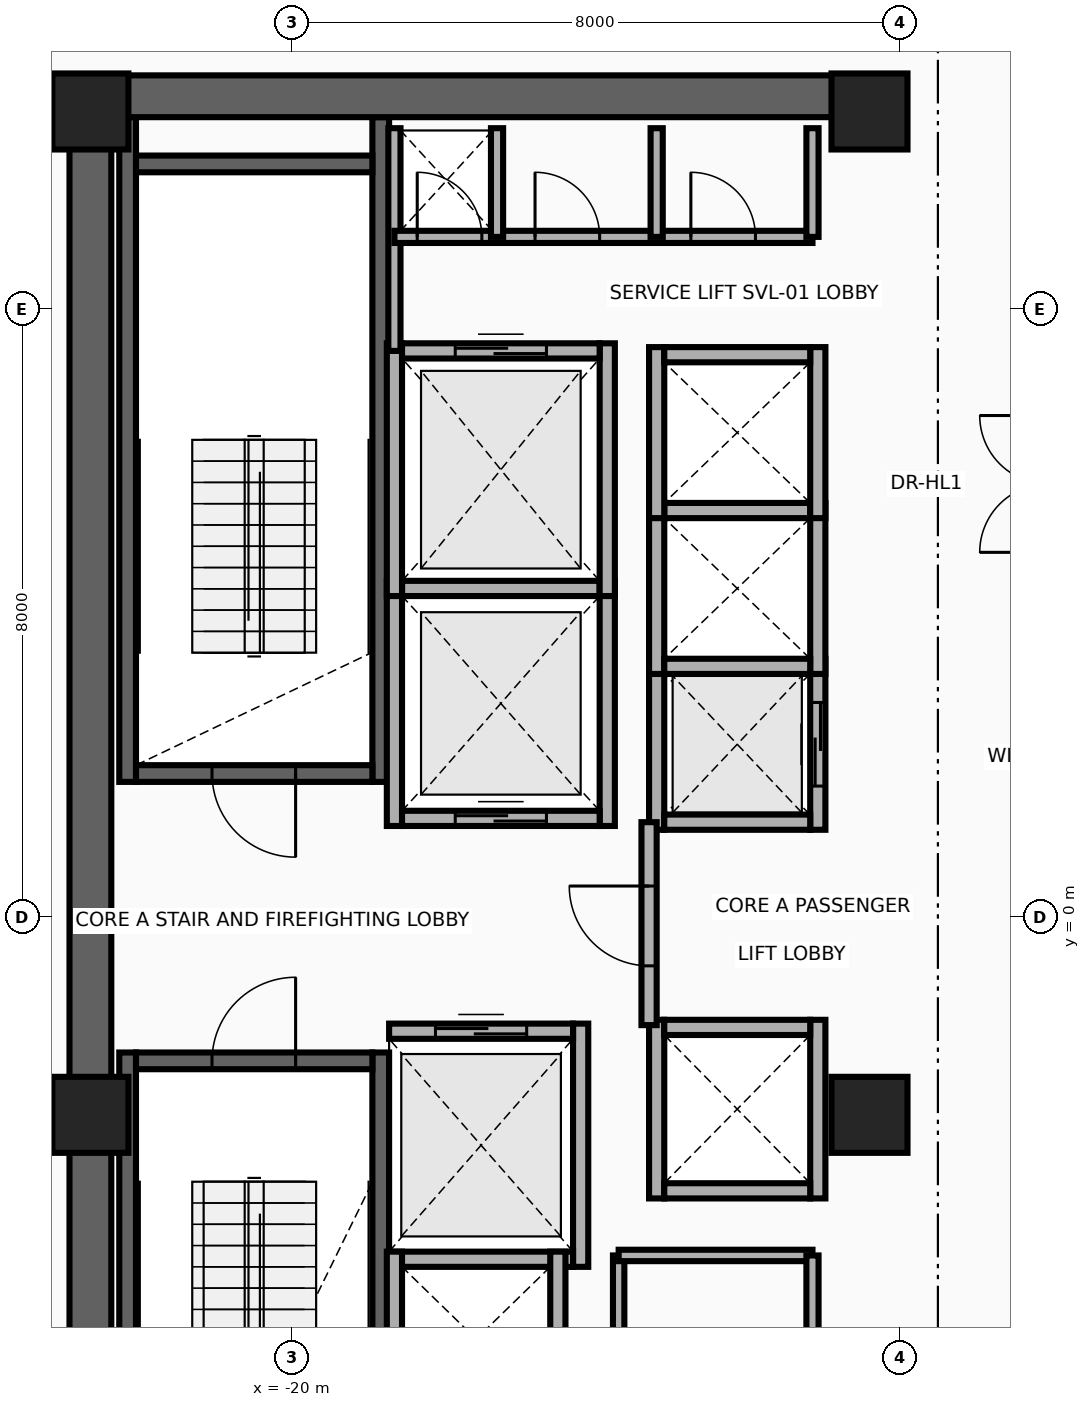
"""IFC4 building model, lengths in metres.
Left out: names, types, materials, properties, quantities, classifications, styles, units other than length and angle.
Written with IfcOpenShell. Run it as: python <this file> out.ifc"""

import sys

from ifc_helpers import new_model, si_unit, direction, frame, frame_2d, origin, origin_2d, place, context, subcontext, project, spatial, rectangle, extrude, source, transform, mapped, element, fill, save


model = new_model("IFC4")
c1 = context("Model", 3, precision=1e-05, world=origin(), true_north=direction((0.0, 1.0)))
c2 = subcontext(c1, "Body", "Model", "MODEL_VIEW")
j1 = project(units=[si_unit("LENGTHUNIT", "METRE"), si_unit("PLANEANGLEUNIT", "RADIAN")], contexts=[c1])
p1 = place(None, origin())
s1 = spatial("IfcSite", under=j1, at=p1, CompositionType="ELEMENT")
p2 = place(p1, origin())
s2 = spatial("IfcBuilding", under=s1, at=p2, CompositionType="ELEMENT")
p3 = place(p2, frame((0.0, 0.0, 192.35)))
s3 = spatial("IfcBuildingStorey", under=s2, at=p3, CompositionType="ELEMENT", Elevation=192.35)
for number, where, z_axis, x_axis in (
    (1, (-22.16, 1.78, 0.0), (0.0, 0.0, 1.0), (0.0, 1.0, 0.0)),
    (2, (-18.83, 1.78, 0.0), (0.0, 0.0, 1.0), (0.0, 1.0, 0.0)),
):
    element("IfcWall", number, at=place(p3, frame(where, z_axis=z_axis, x_axis=x_axis)), inside=s3, PredefinedType="SHEAR", context=c2, shape_type="SweptSolid", body=[
        extrude(rectangle(XDim=8.745, YDim=0.22, at=frame_2d((4.373, 0.0))), origin(), (0.0, 0.0, 1.0), 3.71),
    ])
p4 = place(p3, frame((-22.05, 1.89, 0.0), z_axis=(0.0, 0.0, 1.0), x_axis=(1.0, 0.0, 0.0)))
e3 = element("IfcWall", 3, at=p4, inside=s3, PredefinedType="SHEAR", context=c2, shape_type="SweptSolid", body=[
    extrude(rectangle(XDim=3.11, YDim=0.22, at=frame_2d((1.555, 0.0))), origin(), (0.0, 0.0, 1.0), 3.71),
])
p5 = place(p4, frame((1.0, 0.0, 0.0)))
e4 = element("IfcOpeningElement", 4, at=p5, cuts=e3, PredefinedType="OPENING", context=c2, shape_type="SweptSolid", body=[
    extrude(rectangle(XDim=1.1, YDim=2.15, at=frame_2d((0.55, 1.075))), frame((0.0, 0.125, 0.0), z_axis=(0.0, -1.0, 0.0), x_axis=(1.0, 0.0, 0.0)), (0.0, 0.0, 1.0), 0.25),
])
p6 = place(p3, frame((-22.05, 9.91, 0.0), z_axis=(0.0, 0.0, 1.0), x_axis=(1.0, 0.0, 0.0)))
e5 = element("IfcWall", 5, at=p6, inside=s3, PredefinedType="SHEAR", context=c2, shape_type="SweptSolid", body=[
    extrude(rectangle(XDim=3.11, YDim=0.22, at=frame_2d((1.555, 0.0))), origin(), (0.0, 0.0, 1.0), 3.71),
])
for number, where, z_axis, x_axis in (
    (6, (-22.16, -10.525, 0.0), (0.0, 0.0, 1.0), (0.0, 1.0, 0.0)),
    (7, (-18.83, -10.525, 0.0), (0.0, 0.0, 1.0), (0.0, 1.0, 0.0)),
):
    element("IfcWall", number, at=place(p3, frame(where, z_axis=z_axis, x_axis=x_axis)), inside=s3, PredefinedType="SHEAR", context=c2, shape_type="SweptSolid", body=[
        extrude(rectangle(XDim=8.745, YDim=0.22, at=frame_2d((4.373, 0.0))), origin(), (0.0, 0.0, 1.0), 3.71),
    ])
p7 = place(p3, frame((-22.05, -1.89, 0.0), z_axis=(0.0, 0.0, 1.0), x_axis=(1.0, 0.0, 0.0)))
e8 = element("IfcWall", 8, at=p7, inside=s3, PredefinedType="SHEAR", context=c2, shape_type="SweptSolid", body=[
    extrude(rectangle(XDim=3.11, YDim=0.22, at=frame_2d((1.555, 0.0))), origin(), (0.0, 0.0, 1.0), 3.71),
])
p8 = place(p7, frame((1.0, 0.0, 0.0)))
e9 = element("IfcOpeningElement", 9, at=p8, cuts=e8, PredefinedType="OPENING", context=c2, shape_type="SweptSolid", body=[
    extrude(rectangle(XDim=1.1, YDim=2.15, at=frame_2d((0.55, 1.075))), frame((0.0, 0.125, 0.0), z_axis=(0.0, -1.0, 0.0), x_axis=(1.0, 0.0, 0.0)), (0.0, 0.0, 1.0), 0.25),
])
p9 = place(p3, frame((-22.65, -11.075, 0.0), z_axis=(0.0, 0.0, 1.0), x_axis=(0.0, 1.0, 0.0)))
e10 = element("IfcWall", 10, at=p9, inside=s3, PredefinedType="SHEAR", context=c2, shape_type="SweptSolid", body=[
    extrude(rectangle(XDim=22.15, YDim=0.55, at=frame_2d((11.075, 0.0))), origin(), (0.0, 0.0, 1.0), 3.71),
])
p10 = place(p3, frame((-22.65, 10.8, 0.0), z_axis=(0.0, 0.0, 1.0), x_axis=(1.0, 0.0, 0.0)))
e11 = element("IfcWall", 11, at=p10, inside=s3, PredefinedType="SHEAR", context=c2, shape_type="SweptSolid", body=[
    extrude(rectangle(XDim=10.25, YDim=0.55, at=frame_2d((5.125, 0.0))), origin(), (0.0, 0.0, 1.0), 3.71),
])
m1 = source(origin(), c2, "Body", "SweptSolid", [
    extrude(rectangle(XDim=1.0, YDim=1.0, at=origin_2d()), origin(), (0.0, 0.0, 1.0), 3.95),
])
for number, where, z_axis, x_axis in (
    (12, (-22.65, -2.6, 0.0), (0.0, 0.0, 1.0), (1.0, 0.0, 0.0)),
    (13, (-12.4, -2.6, 0.0), (0.0, 0.0, 1.0), (1.0, 0.0, 0.0)),
    (14, (-22.65, 10.6, 0.0), (0.0, 0.0, 1.0), (1.0, 0.0, 0.0)),
    (15, (-12.4, 10.6, 0.0), (0.0, 0.0, 1.0), (1.0, 0.0, 0.0)),
):
    element("IfcColumn", number, at=place(p3, frame(where, z_axis=z_axis, x_axis=x_axis)), inside=s3, PredefinedType="COLUMN", context=c2, shape_type="MappedRepresentation", body=[
        mapped(m1, transform((0.0, 0.0, 0.0), x_axis=(1.0, 0.0, 0.0), y_axis=(0.0, 1.0, 0.0), z_axis=(0.0, 0.0, 1.0), scale=1.0)),
    ])
for number, where, z_axis, x_axis in (
    (16, (-18.65, 1.2, 0.0), (0.0, 0.0, 1.0), (0.0, 1.0, 0.0)),
    (17, (-15.85, 1.2, 0.0), (0.0, 0.0, 1.0), (0.0, 1.0, 0.0)),
):
    element("IfcWall", number, at=place(p3, frame(where, z_axis=z_axis, x_axis=x_axis)), inside=s3, PredefinedType="MOVABLE", context=c2, shape_type="SweptSolid", body=[
        extrude(rectangle(XDim=3.225, YDim=0.2, at=frame_2d((1.613, 0.0))), origin(), (0.0, 0.0, 1.0), 3.71),
    ])
p11 = place(p3, frame((-18.55, 1.3, 0.0), z_axis=(0.0, 0.0, 1.0), x_axis=(1.0, 0.0, 0.0)))
e18 = element("IfcWall", 18, at=p11, inside=s3, PredefinedType="MOVABLE", context=c2, shape_type="SweptSolid", body=[
    extrude(rectangle(XDim=2.6, YDim=0.2, at=frame_2d((1.3, 0.0))), origin(), (0.0, 0.0, 1.0), 3.71),
])
p12 = place(p11, frame((0.7, 0.0, 0.0)))
e19 = element("IfcOpeningElement", 19, at=p12, cuts=e18, PredefinedType="OPENING", context=c2, shape_type="SweptSolid", body=[
    extrude(rectangle(XDim=1.2, YDim=2.1, at=frame_2d((0.6, 1.05))), frame((0.0, 0.115, 0.0), z_axis=(0.0, -1.0, 0.0), x_axis=(1.0, 0.0, 0.0)), (0.0, 0.0, 1.0), 0.23),
])
p13 = place(p3, frame((-18.55, 4.325, 0.0), z_axis=(0.0, 0.0, 1.0), x_axis=(1.0, 0.0, 0.0)))
e20 = element("IfcWall", 20, at=p13, inside=s3, PredefinedType="MOVABLE", context=c2, shape_type="SweptSolid", body=[
    extrude(rectangle(XDim=2.6, YDim=0.2, at=frame_2d((1.3, 0.0))), origin(), (0.0, 0.0, 1.0), 3.71),
])
p14 = place(p3, frame((-16.2, -4.6, 0.0), z_axis=(0.0, 0.0, 1.0), x_axis=(0.0, 1.0, 0.0)))
e21 = element("IfcWall", 21, at=p14, inside=s3, PredefinedType="MOVABLE", context=c2, shape_type="SweptSolid", body=[
    extrude(rectangle(XDim=3.2, YDim=0.2, at=frame_2d((1.6, 0.0))), origin(), (0.0, 0.0, 1.0), 3.71),
])
p15 = place(p3, frame((-18.72, -4.5, 0.0), z_axis=(0.0, 0.0, 1.0), x_axis=(1.0, 0.0, 0.0)))
e22 = element("IfcWall", 22, at=p15, inside=s3, PredefinedType="MOVABLE", context=c2, shape_type="SweptSolid", body=[
    extrude(rectangle(XDim=2.42, YDim=0.2, at=frame_2d((1.21, 0.0))), origin(), (0.0, 0.0, 1.0), 3.71),
])
p16 = place(p3, frame((-18.72, -1.5, 0.0), z_axis=(0.0, 0.0, 1.0), x_axis=(1.0, 0.0, 0.0)))
e23 = element("IfcWall", 23, at=p16, inside=s3, PredefinedType="MOVABLE", context=c2, shape_type="SweptSolid", body=[
    extrude(rectangle(XDim=2.42, YDim=0.2, at=frame_2d((1.21, 0.0))), origin(), (0.0, 0.0, 1.0), 3.71),
])
p17 = place(p16, frame((0.61, 0.0, 0.0)))
e24 = element("IfcOpeningElement", 24, at=p17, cuts=e23, PredefinedType="OPENING", context=c2, shape_type="SweptSolid", body=[
    extrude(rectangle(XDim=1.2, YDim=2.1, at=frame_2d((0.6, 1.05))), frame((0.0, 0.115, 0.0), z_axis=(0.0, -1.0, 0.0), x_axis=(1.0, 0.0, 0.0)), (0.0, 0.0, 1.0), 0.23),
])
for number, where, z_axis, x_axis in (
    (25, (-18.65, 4.225, 0.0), (0.0, 0.0, 1.0), (0.0, 1.0, 0.0)),
    (26, (-15.85, 4.225, 0.0), (0.0, 0.0, 1.0), (0.0, 1.0, 0.0)),
):
    element("IfcWall", number, at=place(p3, frame(where, z_axis=z_axis, x_axis=x_axis)), inside=s3, PredefinedType="MOVABLE", context=c2, shape_type="SweptSolid", body=[
        extrude(rectangle(XDim=3.325, YDim=0.2, at=frame_2d((1.663, 0.0))), origin(), (0.0, 0.0, 1.0), 3.71),
    ])
p18 = place(p3, frame((-18.55, 7.45, 0.0), z_axis=(0.0, 0.0, 1.0), x_axis=(1.0, 0.0, 0.0)))
e27 = element("IfcWall", 27, at=p18, inside=s3, PredefinedType="MOVABLE", context=c2, shape_type="SweptSolid", body=[
    extrude(rectangle(XDim=2.6, YDim=0.2, at=frame_2d((1.3, 0.0))), origin(), (0.0, 0.0, 1.0), 3.71),
])
p19 = place(p18, frame((0.7, 0.0, 0.0)))
e28 = element("IfcOpeningElement", 28, at=p19, cuts=e27, PredefinedType="OPENING", context=c2, shape_type="SweptSolid", body=[
    extrude(rectangle(XDim=1.2, YDim=2.1, at=frame_2d((0.6, 1.05))), frame((0.0, 0.115, 0.0), z_axis=(0.0, -1.0, 0.0), x_axis=(1.0, 0.0, 0.0)), (0.0, 0.0, 1.0), 0.23),
])
p20 = place(p3, frame((-15.2, 1.15, 0.0), z_axis=(0.0, 0.0, 1.0), x_axis=(0.0, 1.0, 0.0)))
e29 = element("IfcWall", 29, at=p20, inside=s3, PredefinedType="MOVABLE", context=c2, shape_type="SweptSolid", body=[
    extrude(rectangle(XDim=2.25, YDim=0.2, at=frame_2d((1.125, 0.0))), origin(), (0.0, 0.0, 1.0), 3.71),
])
p21 = place(p3, frame((-13.08, 1.15, 0.0), z_axis=(0.0, 0.0, 1.0), x_axis=(0.0, 1.0, 0.0)))
e30 = element("IfcWall", 30, at=p21, inside=s3, PredefinedType="MOVABLE", context=c2, shape_type="SweptSolid", body=[
    extrude(rectangle(XDim=2.25, YDim=0.2, at=frame_2d((1.125, 0.0))), origin(), (0.0, 0.0, 1.0), 3.71),
])
p22 = place(p21, frame((0.575, 0.0, 0.0)))
e31 = element("IfcOpeningElement", 31, at=p22, cuts=e30, PredefinedType="OPENING", context=c2, shape_type="SweptSolid", body=[
    extrude(rectangle(XDim=1.1, YDim=2.1, at=frame_2d((0.55, 1.05))), frame((0.0, 0.115, 0.0), z_axis=(0.0, -1.0, 0.0), x_axis=(1.0, 0.0, 0.0)), (0.0, 0.0, 1.0), 0.23),
])
p23 = place(p3, frame((-15.1, 1.25, 0.0), z_axis=(0.0, 0.0, 1.0), x_axis=(1.0, 0.0, 0.0)))
e32 = element("IfcWall", 32, at=p23, inside=s3, PredefinedType="MOVABLE", context=c2, shape_type="SweptSolid", body=[
    extrude(rectangle(XDim=1.92, YDim=0.2, at=frame_2d((0.96, 0.0))), origin(), (0.0, 0.0, 1.0), 3.71),
])
for number, where, z_axis, x_axis in (
    (33, (-15.2, 3.2, 0.0), (0.0, 0.0, 1.0), (0.0, 1.0, 0.0)),
    (34, (-13.08, 3.2, 0.0), (0.0, 0.0, 1.0), (0.0, 1.0, 0.0)),
):
    element("IfcWall", number, at=place(p3, frame(where, z_axis=z_axis, x_axis=x_axis)), inside=s3, PredefinedType="MOVABLE", context=c2, shape_type="SweptSolid", body=[
        extrude(rectangle(XDim=2.25, YDim=0.2, at=frame_2d((1.125, 0.0))), origin(), (0.0, 0.0, 1.0), 3.71),
    ])
for number, where, z_axis, x_axis in (
    (35, (-15.1, 3.3, 0.0), (0.0, 0.0, 1.0), (1.0, 0.0, 0.0)),
    (36, (-15.1, 5.35, 0.0), (0.0, 0.0, 1.0), (1.0, 0.0, 0.0)),
):
    element("IfcWall", number, at=place(p3, frame(where, z_axis=z_axis, x_axis=x_axis)), inside=s3, PredefinedType="MOVABLE", context=c2, shape_type="SweptSolid", body=[
        extrude(rectangle(XDim=1.92, YDim=0.2, at=frame_2d((0.96, 0.0))), origin(), (0.0, 0.0, 1.0), 3.71),
    ])
for number, where, z_axis, x_axis in (
    (37, (-15.2, 5.25, 0.0), (0.0, 0.0, 1.0), (0.0, 1.0, 0.0)),
    (38, (-13.08, 5.25, 0.0), (0.0, 0.0, 1.0), (0.0, 1.0, 0.0)),
):
    element("IfcWall", number, at=place(p3, frame(where, z_axis=z_axis, x_axis=x_axis)), inside=s3, PredefinedType="MOVABLE", context=c2, shape_type="SweptSolid", body=[
        extrude(rectangle(XDim=2.25, YDim=0.2, at=frame_2d((1.125, 0.0))), origin(), (0.0, 0.0, 1.0), 3.71),
    ])
p24 = place(p3, frame((-15.1, 7.4, 0.0), z_axis=(0.0, 0.0, 1.0), x_axis=(1.0, 0.0, 0.0)))
e39 = element("IfcWall", 39, at=p24, inside=s3, PredefinedType="MOVABLE", context=c2, shape_type="SweptSolid", body=[
    extrude(rectangle(XDim=1.92, YDim=0.2, at=frame_2d((0.96, 0.0))), origin(), (0.0, 0.0, 1.0), 3.71),
])
for number, where, z_axis, x_axis in (
    (40, (-18.65, -6.7, 0.0), (0.0, 0.0, 1.0), (0.0, 1.0, 0.0)),
    (41, (-16.5, -6.7, 0.0), (0.0, 0.0, 1.0), (0.0, 1.0, 0.0)),
):
    element("IfcWall", number, at=place(p3, frame(where, z_axis=z_axis, x_axis=x_axis)), inside=s3, PredefinedType="MOVABLE", context=c2, shape_type="SweptSolid", body=[
        extrude(rectangle(XDim=2.3, YDim=0.2, at=frame_2d((1.15, 0.0))), origin(), (0.0, 0.0, 1.0), 3.71),
    ])
for number, where, z_axis, x_axis in (
    (42, (-15.2, -3.7, 0.0), (0.0, 0.0, 1.0), (0.0, 1.0, 0.0)),
    (43, (-13.08, -3.7, 0.0), (0.0, 0.0, 1.0), (0.0, 1.0, 0.0)),
):
    element("IfcWall", number, at=place(p3, frame(where, z_axis=z_axis, x_axis=x_axis)), inside=s3, PredefinedType="MOVABLE", context=c2, shape_type="SweptSolid", body=[
        extrude(rectangle(XDim=2.35, YDim=0.2, at=frame_2d((1.175, 0.0))), origin(), (0.0, 0.0, 1.0), 3.71),
    ])
for number, where, z_axis, x_axis in (
    (44, (-15.1, -3.6, 0.0), (0.0, 0.0, 1.0), (1.0, 0.0, 0.0)),
    (45, (-15.1, -1.45, 0.0), (0.0, 0.0, 1.0), (1.0, 0.0, 0.0)),
):
    element("IfcWall", number, at=place(p3, frame(where, z_axis=z_axis, x_axis=x_axis)), inside=s3, PredefinedType="MOVABLE", context=c2, shape_type="SweptSolid", body=[
        extrude(rectangle(XDim=1.92, YDim=0.2, at=frame_2d((0.96, 0.0))), origin(), (0.0, 0.0, 1.0), 3.71),
    ])
p25 = place(p3, frame((-15.3, -1.42, 0.0), z_axis=(0.0, 0.0, 1.0), x_axis=(0.0, 1.0, 0.0)))
e46 = element("IfcWall", 46, at=p25, inside=s3, PredefinedType="PARTITIONING", context=c2, shape_type="SweptSolid", body=[
    extrude(rectangle(XDim=2.67, YDim=0.2, at=frame_2d((1.335, 0.0))), origin(), (0.0, 0.0, 1.0), 3.71),
])
p26 = place(p25, frame((0.78, 0.0, 0.0)))
e47 = element("IfcOpeningElement", 47, at=p26, cuts=e46, PredefinedType="OPENING", context=c2, shape_type="SweptSolid", body=[
    extrude(rectangle(XDim=1.05, YDim=2.15, at=frame_2d((0.525, 1.075))), frame((0.0, 0.115, 0.0), z_axis=(0.0, -1.0, 0.0), x_axis=(1.0, 0.0, 0.0)), (0.0, 0.0, 1.0), 0.23),
])
p27 = place(p3, frame((-18.65, 7.45, 0.0), z_axis=(0.0, 0.0, 1.0), x_axis=(0.0, 1.0, 0.0)))
e48 = element("IfcWall", 48, at=p27, inside=s3, PredefinedType="PARTITIONING", context=c2, shape_type="SweptSolid", body=[
    extrude(rectangle(XDim=2.93, YDim=0.16, at=frame_2d((1.465, 0.0))), origin(), (0.0, 0.0, 1.0), 3.71),
])
p28 = place(p3, frame((-18.65, 8.95, 0.0), z_axis=(0.0, 0.0, 1.0), x_axis=(1.0, 0.0, 0.0)))
e49 = element("IfcWall", 49, at=p28, inside=s3, PredefinedType="PARTITIONING", context=c2, shape_type="SweptSolid", body=[
    extrude(rectangle(XDim=5.5, YDim=0.16, at=frame_2d((2.75, 0.0))), origin(), (0.0, 0.0, 1.0), 3.71),
])
p29 = place(p28, frame((0.3, 0.0, 0.0)))
e50 = element("IfcOpeningElement", 50, at=p29, cuts=e49, PredefinedType="OPENING", context=c2, shape_type="SweptSolid", body=[
    extrude(rectangle(XDim=0.85, YDim=2.05, at=frame_2d((0.425, 1.025))), frame((0.0, 0.095, 0.0), z_axis=(0.0, -1.0, 0.0), x_axis=(1.0, 0.0, 0.0)), (0.0, 0.0, 1.0), 0.19),
])
p30 = place(p28, frame((1.85, 0.0, 0.0)))
e51 = element("IfcOpeningElement", 51, at=p30, cuts=e49, PredefinedType="OPENING", context=c2, shape_type="SweptSolid", body=[
    extrude(rectangle(XDim=0.85, YDim=2.05, at=frame_2d((0.425, 1.025))), frame((0.0, 0.095, 0.0), z_axis=(0.0, -1.0, 0.0), x_axis=(1.0, 0.0, 0.0)), (0.0, 0.0, 1.0), 0.19),
])
p31 = place(p28, frame((3.9, 0.0, 0.0)))
e52 = element("IfcOpeningElement", 52, at=p31, cuts=e49, PredefinedType="OPENING", context=c2, shape_type="SweptSolid", body=[
    extrude(rectangle(XDim=0.85, YDim=2.05, at=frame_2d((0.425, 1.025))), frame((0.0, 0.095, 0.0), z_axis=(0.0, -1.0, 0.0), x_axis=(1.0, 0.0, 0.0)), (0.0, 0.0, 1.0), 0.19),
])
for number, where, z_axis, x_axis in (
    (53, (-13.15, 8.95, 0.0), (0.0, 0.0, 1.0), (0.0, 1.0, 0.0)),
    (54, (-17.3, 8.95, 0.0), (0.0, 0.0, 1.0), (0.0, 1.0, 0.0)),
    (55, (-15.2, 8.95, 0.0), (0.0, 0.0, 1.0), (0.0, 1.0, 0.0)),
):
    element("IfcWall", number, at=place(p3, frame(where, z_axis=z_axis, x_axis=x_axis)), inside=s3, PredefinedType="PARTITIONING", context=c2, shape_type="SweptSolid", body=[
        extrude(rectangle(XDim=1.43, YDim=0.16, at=frame_2d((0.715, 0.0))), origin(), (0.0, 0.0, 1.0), 3.71),
    ])
p32 = place(p3, frame((-15.7, -6.58, 0.0), z_axis=(0.0, 0.0, 1.0), x_axis=(0.0, 1.0, 0.0)))
e56 = element("IfcWall", 56, at=p32, inside=s3, PredefinedType="PARTITIONING", context=c2, shape_type="SweptSolid", body=[
    extrude(rectangle(XDim=2.13, YDim=0.15, at=frame_2d((1.065, 0.0))), origin(), (0.0, 0.0, 1.0), 3.71),
])
p33 = place(p3, frame((-15.7, -4.45, 0.0), z_axis=(0.0, 0.0, 1.0), x_axis=(1.0, 0.0, 0.0)))
e57 = element("IfcWall", 57, at=p33, inside=s3, PredefinedType="PARTITIONING", context=c2, shape_type="SweptSolid", body=[
    extrude(rectangle(XDim=2.55, YDim=0.15, at=frame_2d((1.275, 0.0))), origin(), (0.0, 0.0, 1.0), 3.71),
])
p34 = place(p3, frame((-13.15, -6.58, 0.0), z_axis=(0.0, 0.0, 1.0), x_axis=(0.0, 1.0, 0.0)))
e58 = element("IfcWall", 58, at=p34, inside=s3, PredefinedType="PARTITIONING", context=c2, shape_type="SweptSolid", body=[
    extrude(rectangle(XDim=2.13, YDim=0.16, at=frame_2d((1.065, 0.0))), origin(), (0.0, 0.0, 1.0), 3.71),
])
p35 = place(p12, origin())
e59 = element("IfcDoor", 59, at=p35, inside=s3, OperationType="DOUBLE_DOOR_SLIDING", PredefinedType="DOOR", context=c2, shape_type="SweptSolid", body=[
    extrude(rectangle(XDim=1.2, YDim=2.1, at=frame_2d((0.6, 1.05))), frame((0.0, 0.025, 0.0), z_axis=(0.0, -1.0, 0.0), x_axis=(1.0, 0.0, 0.0)), (0.0, 0.0, 1.0), 0.05),
])
fill(e19, e59)
p36 = place(p17, origin())
e60 = element("IfcDoor", 60, at=p36, inside=s3, OperationType="DOUBLE_DOOR_SLIDING", PredefinedType="DOOR", context=c2, shape_type="SweptSolid", body=[
    extrude(rectangle(XDim=1.2, YDim=2.1, at=frame_2d((0.6, 1.05))), frame((0.0, 0.025, 0.0), z_axis=(0.0, -1.0, 0.0), x_axis=(1.0, 0.0, 0.0)), (0.0, 0.0, 1.0), 0.05),
])
fill(e24, e60)
p37 = place(p19, origin())
e61 = element("IfcDoor", 61, at=p37, inside=s3, OperationType="DOUBLE_DOOR_SLIDING", PredefinedType="DOOR", context=c2, shape_type="SweptSolid", body=[
    extrude(rectangle(XDim=1.2, YDim=2.1, at=frame_2d((0.6, 1.05))), frame((0.0, 0.025, 0.0), z_axis=(0.0, -1.0, 0.0), x_axis=(1.0, 0.0, 0.0)), (0.0, 0.0, 1.0), 0.05),
])
fill(e28, e61)
p38 = place(p22, origin())
e62 = element("IfcDoor", 62, at=p38, inside=s3, OperationType="DOUBLE_DOOR_SLIDING", PredefinedType="DOOR", context=c2, shape_type="SweptSolid", body=[
    extrude(rectangle(XDim=1.1, YDim=2.1, at=frame_2d((0.55, 1.05))), frame((0.0, 0.025, 0.0), z_axis=(0.0, -1.0, 0.0), x_axis=(1.0, 0.0, 0.0)), (0.0, 0.0, 1.0), 0.05),
])
fill(e31, e62)
p39 = place(p26, origin())
e63 = element("IfcDoor", 63, at=p39, inside=s3, OperationType="SINGLE_SWING_RIGHT", PredefinedType="DOOR", context=c2, shape_type="SweptSolid", body=[
    extrude(rectangle(XDim=1.05, YDim=2.15, at=frame_2d((0.525, 1.075))), frame((0.0, 0.025, 0.0), z_axis=(0.0, -1.0, 0.0), x_axis=(1.0, 0.0, 0.0)), (0.0, 0.0, 1.0), 0.05),
])
fill(e47, e63)
p40 = place(p5, frame((1.1, 0.0, 0.0), z_axis=(0.0, 0.0, 1.0), x_axis=(-1.0, 0.0, 0.0)))
e64 = element("IfcDoor", 64, at=p40, inside=s3, OperationType="SINGLE_SWING_LEFT", PredefinedType="DOOR", context=c2, shape_type="SweptSolid", body=[
    extrude(rectangle(XDim=1.1, YDim=2.15, at=frame_2d((0.55, 1.075))), frame((0.0, 0.025, 0.0), z_axis=(0.0, -1.0, 0.0), x_axis=(1.0, 0.0, 0.0)), (0.0, 0.0, 1.0), 0.05),
])
fill(e4, e64)
p41 = place(p8, origin())
e65 = element("IfcDoor", 65, at=p41, inside=s3, OperationType="SINGLE_SWING_RIGHT", PredefinedType="DOOR", context=c2, shape_type="SweptSolid", body=[
    extrude(rectangle(XDim=1.1, YDim=2.15, at=frame_2d((0.55, 1.075))), frame((0.0, 0.025, 0.0), z_axis=(0.0, -1.0, 0.0), x_axis=(1.0, 0.0, 0.0)), (0.0, 0.0, 1.0), 0.05),
])
fill(e9, e65)
p42 = place(p29, origin())
e66 = element("IfcDoor", 66, at=p42, inside=s3, OperationType="SINGLE_SWING_LEFT", PredefinedType="DOOR", context=c2, shape_type="SweptSolid", body=[
    extrude(rectangle(XDim=0.85, YDim=2.05, at=frame_2d((0.425, 1.025))), frame((0.0, 0.025, 0.0), z_axis=(0.0, -1.0, 0.0), x_axis=(1.0, 0.0, 0.0)), (0.0, 0.0, 1.0), 0.05),
])
fill(e50, e66)
p43 = place(p30, origin())
e67 = element("IfcDoor", 67, at=p43, inside=s3, OperationType="SINGLE_SWING_RIGHT", PredefinedType="DOOR", context=c2, shape_type="SweptSolid", body=[
    extrude(rectangle(XDim=0.85, YDim=2.05, at=frame_2d((0.425, 1.025))), frame((0.0, 0.025, 0.0), z_axis=(0.0, -1.0, 0.0), x_axis=(1.0, 0.0, 0.0)), (0.0, 0.0, 1.0), 0.05),
])
fill(e51, e67)
p44 = place(p31, origin())
e68 = element("IfcDoor", 68, at=p44, inside=s3, OperationType="SINGLE_SWING_LEFT", PredefinedType="DOOR", context=c2, shape_type="SweptSolid", body=[
    extrude(rectangle(XDim=0.85, YDim=2.05, at=frame_2d((0.425, 1.025))), frame((0.0, 0.025, 0.0), z_axis=(0.0, -1.0, 0.0), x_axis=(1.0, 0.0, 0.0)), (0.0, 0.0, 1.0), 0.05),
])
fill(e52, e68)
save(model, sys.argv[1])
